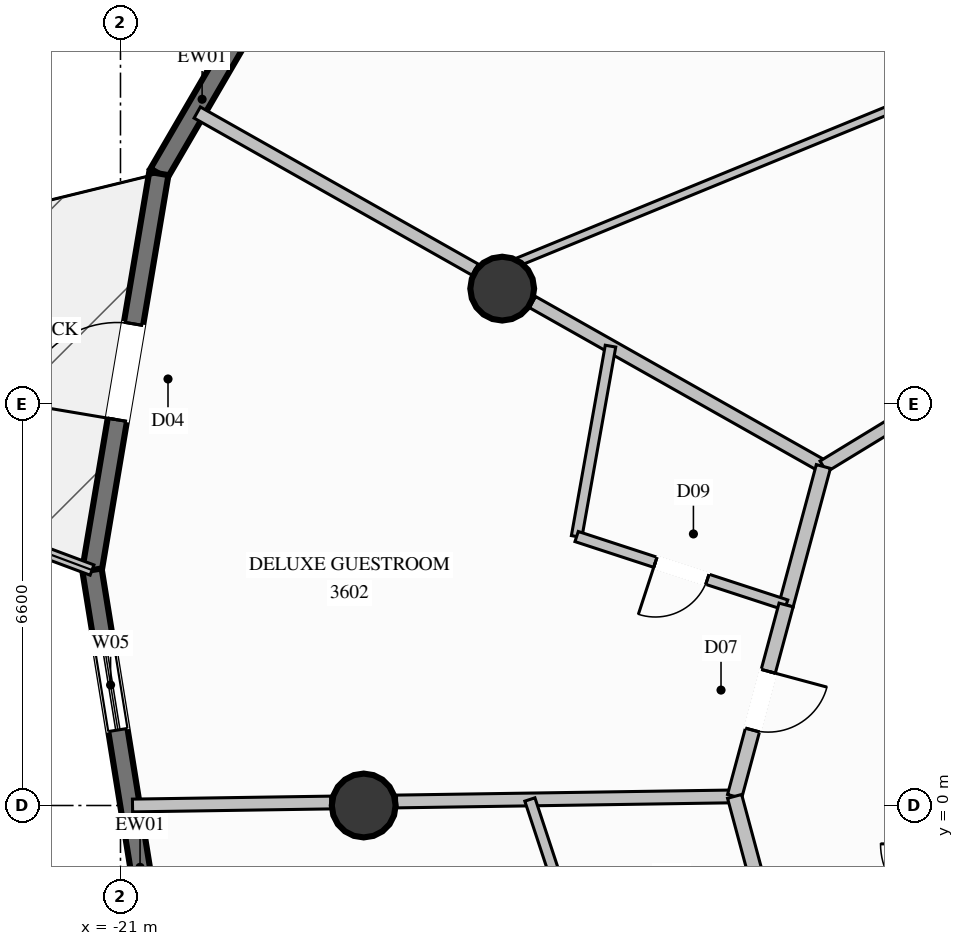
"""IFC4 building model, lengths in metres.
Left out: names, types, materials, properties, quantities, classifications, styles, units other than length and angle.
Written with IfcOpenShell. Run it as: python <this file> out.ifc"""

import sys

from ifc_helpers import new_model, si_unit, direction, frame, frame_2d, origin, origin_2d, place, context, subcontext, project, spatial, rectangle, circle, extrude, element, fill, save


model = new_model("IFC4")
c1 = context("Model", 3, precision=1e-05, world=origin(), true_north=direction((0.0, 1.0)))
c2 = subcontext(c1, "Body", "Model", "MODEL_VIEW")
j1 = project(units=[si_unit("LENGTHUNIT", "METRE"), si_unit("PLANEANGLEUNIT", "RADIAN")], contexts=[c1])
p1 = place(None, origin())
s1 = spatial("IfcSite", under=j1, at=p1, CompositionType="ELEMENT")
p2 = place(p1, origin())
s2 = spatial("IfcBuilding", under=s1, at=p2, CompositionType="ELEMENT")
p3 = place(p2, frame((0.0, 0.0, 135.0)))
s3 = spatial("IfcBuildingStorey", under=s2, at=p3, CompositionType="ELEMENT", Elevation=135.0)
for number, where, z_axis, x_axis in (
    (1, (-14.722, 8.5, 0.0), (0.0, 0.0, 1.0), (1.0, 0.0, 0.0)),
    (2, (-17.0, 0.0, 0.0), (0.0, 0.0, 1.0), (1.0, 0.0, 0.0)),
):
    element("IfcColumn", number, at=place(p3, frame(where, z_axis=z_axis, x_axis=x_axis)), inside=s3, PredefinedType="COLUMN", context=c2, shape_type="SweptSolid", body=[
        extrude(circle(Radius=0.525, at=origin_2d()), origin(), (0.0, 0.0, 1.0), 3.6),
    ])
p4 = place(p3, frame((-20.369, 10.393, 0.0), z_axis=(0.0, 0.0, 1.0), x_axis=(0.503308483644, 0.86410680491, 0.0)))
e3 = element("IfcWall", 3, at=p4, inside=s3, PredefinedType="SOLIDWALL", context=c2, shape_type="SweptSolid", body=[
    extrude(rectangle(XDim=6.369, YDim=0.32, at=frame_2d((3.185, 0.0))), origin(), (0.0, 0.0, 1.0), 3.35),
])
p5 = place(p4, frame((3.077, 0.0, 0.85)))
e4 = element("IfcOpeningElement", 4, at=p5, cuts=e3, PredefinedType="OPENING", context=c2, shape_type="SweptSolid", body=[
    extrude(rectangle(XDim=1.5, YDim=1.2, at=frame_2d((0.75, 0.6))), frame((0.0, 0.17, 0.0), z_axis=(0.0, -1.0, 0.0), x_axis=(1.0, 0.0, 0.0)), (0.0, 0.0, 1.0), 0.34),
])
p6 = place(p3, frame((-21.468, 3.872, 0.0), z_axis=(0.0, 0.0, 1.0), x_axis=(0.166206715806, 0.986090932734, 0.0)))
e5 = element("IfcWall", 5, at=p6, inside=s3, PredefinedType="SOLIDWALL", context=c2, shape_type="SweptSolid", body=[
    extrude(rectangle(XDim=6.613, YDim=0.32, at=frame_2d((3.307, 0.0))), origin(), (0.0, 0.0, 1.0), 3.35),
])
p7 = place(p6, frame((2.506, 0.0, 0.0)))
e6 = element("IfcOpeningElement", 6, at=p7, cuts=e5, PredefinedType="OPENING", context=c2, shape_type="SweptSolid", body=[
    extrude(rectangle(XDim=1.6, YDim=2.3, at=frame_2d((0.8, 1.15))), frame((0.0, 0.17, 0.0), z_axis=(0.0, -1.0, 0.0), x_axis=(1.0, 0.0, 0.0)), (0.0, 0.0, 1.0), 0.34),
])
p8 = place(p3, frame((-20.353, -3.028, 0.0), z_axis=(0.0, 0.0, 1.0), x_axis=(-0.159520152435, 0.987194672274, 0.0)))
e7 = element("IfcWall", 7, at=p8, inside=s3, PredefinedType="SOLIDWALL", context=c2, shape_type="SweptSolid", body=[
    extrude(rectangle(XDim=6.99, YDim=0.32, at=frame_2d((3.495, 0.0))), origin(), (0.0, 0.0, 1.0), 3.35),
])
p9 = place(p8, frame((4.325, 0.0, 0.85)))
e8 = element("IfcOpeningElement", 8, at=p9, cuts=e7, PredefinedType="OPENING", context=c2, shape_type="SweptSolid", body=[
    extrude(rectangle(XDim=1.5, YDim=1.2, at=frame_2d((0.75, 0.6))), frame((0.0, 0.17, 0.0), z_axis=(0.0, -1.0, 0.0), x_axis=(1.0, 0.0, 0.0)), (0.0, 0.0, 1.0), 0.34),
])
p10 = place(p3, frame((-23.568, 4.655, 0.0), z_axis=(0.0, 0.0, 1.0), x_axis=(0.93699893961, -0.349332201736, 0.0)))
e9 = element("IfcWall", 9, at=p10, inside=s3, PredefinedType="PARAPET", context=c2, shape_type="SweptSolid", body=[
    extrude(rectangle(XDim=2.241, YDim=0.18, at=frame_2d((1.121, 0.0))), origin(), (0.0, 0.0, 1.0), 1.12),
])
p11 = place(p3, frame((-9.44, 5.575, 0.0), z_axis=(0.0, 0.0, 1.0), x_axis=(-0.87056283872, 0.492057256668, 0.0)))
e10 = element("IfcWall", 10, at=p11, inside=s3, PredefinedType="PARTITIONING", context=c2, shape_type="SweptSolid", body=[
    extrude(rectangle(XDim=5.496, YDim=0.21, at=frame_2d((2.748, 0.0))), origin(), (0.0, 0.0, 1.0), 2.717),
])
p12 = place(p3, frame((-15.168, 8.813, 0.0), z_axis=(0.0, 0.0, 1.0), x_axis=(-0.870568901918, 0.492046529317, 0.0)))
e11 = element("IfcWall", 11, at=p12, inside=s3, PredefinedType="PARTITIONING", context=c2, shape_type="SweptSolid", body=[
    extrude(rectangle(XDim=5.25, YDim=0.21, at=frame_2d((2.625, 0.0))), origin(), (0.0, 0.0, 1.0), 3.35),
])
p13 = place(p3, frame((-10.9, 0.15, 0.0), z_axis=(0.0, 0.0, 1.0), x_axis=(-0.999885899777, -0.015105873936, 0.0)))
e12 = element("IfcWall", 12, at=p13, inside=s3, PredefinedType="PARTITIONING", context=c2, shape_type="SweptSolid", body=[
    extrude(rectangle(XDim=5.56, YDim=0.21, at=frame_2d((2.78, 0.0))), origin(), (0.0, 0.0, 1.0), 2.419),
])
p14 = place(p3, frame((-17.543, 0.049, 0.0), z_axis=(0.0, 0.0, 1.0), x_axis=(-0.999886658015, -0.015055601038, 0.0)))
e13 = element("IfcWall", 13, at=p14, inside=s3, PredefinedType="PARTITIONING", context=c2, shape_type="SweptSolid", body=[
    extrude(rectangle(XDim=3.26, YDim=0.21, at=frame_2d((1.63, 0.0))), origin(), (0.0, 0.0, 1.0), 2.419),
])
p15 = place(p3, frame((-9.44, 5.575, 0.0), z_axis=(0.0, 0.0, 1.0), x_axis=(0.853641534933, 0.520860950579, 0.0)))
e14 = element("IfcWall", 14, at=p15, inside=s3, PredefinedType="PARTITIONING", context=c2, shape_type="SweptSolid", body=[
    extrude(rectangle(XDim=2.448, YDim=0.21, at=frame_2d((1.224, 0.0))), origin(), (0.0, 0.0, 1.0), 3.35),
])
p16 = place(p3, frame((-15.001, 8.718, 0.0), z_axis=(0.0, 0.0, 1.0), x_axis=(0.925283827326, 0.379275412978, 0.0)))
e15 = element("IfcWall", 15, at=p16, inside=s3, PredefinedType="PARTITIONING", context=c2, shape_type="SweptSolid", body=[
    extrude(rectangle(XDim=16.212, YDim=0.135, at=frame_2d((8.106, 0.0))), origin(), (0.0, 0.0, 1.0), 2.806),
])
p17 = place(p16, frame((7.631, 0.0, 0.0)))
e16 = element("IfcOpeningElement", 16, at=p17, cuts=e15, PredefinedType="OPENING", context=c2, shape_type="SweptSolid", body=[
    extrude(rectangle(XDim=0.95, YDim=2.1, at=frame_2d((0.475, 1.05))), frame((0.0, 0.078, 0.0), z_axis=(0.0, -1.0, 0.0), x_axis=(1.0, 0.0, 0.0)), (0.0, 0.0, 1.0), 0.155),
])
p18 = place(p3, frame((-9.44, 5.575, 0.0), z_axis=(0.0, 0.0, 1.0), x_axis=(-0.25988439237, -0.965639737481, 0.0)))
e17 = element("IfcWall", 17, at=p18, inside=s3, PredefinedType="PARTITIONING", context=c2, shape_type="SweptSolid", body=[
    extrude(rectangle(XDim=2.359, YDim=0.24, at=frame_2d((1.179, 0.0))), origin(), (0.0, 0.0, 1.0), 3.35),
])
p19 = place(p3, frame((-12.941, 7.554, 0.0), z_axis=(0.0, 0.0, 1.0), x_axis=(-0.175195404058, -0.984533681698, 0.0)))
e18 = element("IfcWall", 18, at=p19, inside=s3, PredefinedType="PLUMBINGWALL", context=c2, shape_type="SweptSolid", body=[
    extrude(rectangle(XDim=3.18, YDim=0.175, at=frame_2d((1.59, 0.0))), origin(), (0.0, 0.0, 1.0), 3.35),
])
p20 = place(p3, frame((-10.053, 3.297, 0.0), z_axis=(0.0, 0.0, 1.0), x_axis=(-0.950519426141, 0.310665126027, 0.0)))
e19 = element("IfcWall", 19, at=p20, inside=s3, PredefinedType="PLUMBINGWALL", context=c2, shape_type="SweptSolid", body=[
    extrude(rectangle(XDim=3.625, YDim=0.175, at=frame_2d((1.812, 0.0))), origin(), (0.0, 0.0, 1.0), 3.35),
])
p21 = place(p20, frame((1.362, 0.0, 0.0)))
e20 = element("IfcOpeningElement", 20, at=p21, cuts=e19, PredefinedType="OPENING", context=c2, shape_type="SweptSolid", body=[
    extrude(rectangle(XDim=0.9, YDim=2.1, at=frame_2d((0.45, 1.05))), frame((0.0, 0.098, 0.0), z_axis=(0.0, -1.0, 0.0), x_axis=(1.0, 0.0, 0.0)), (0.0, 0.0, 1.0), 0.195),
])
p22 = place(p3, frame((-10.053, 3.297, 0.0), z_axis=(0.0, 0.0, 1.0), x_axis=(-0.25985795735, -0.965646851598, 0.0)))
e21 = element("IfcWall", 21, at=p22, inside=s3, PredefinedType="PARTITIONING", context=c2, shape_type="SweptSolid", body=[
    extrude(rectangle(XDim=3.259, YDim=0.24, at=frame_2d((1.63, 0.0))), origin(), (0.0, 0.0, 1.0), 3.35),
])
p23 = place(p22, frame((1.129, 0.0, 0.0)))
e22 = element("IfcOpeningElement", 22, at=p23, cuts=e21, PredefinedType="OPENING", context=c2, shape_type="SweptSolid", body=[
    extrude(rectangle(XDim=1.0, YDim=2.2, at=frame_2d((0.5, 1.1))), frame((0.0, 0.13, 0.0), z_axis=(0.0, -1.0, 0.0), x_axis=(1.0, 0.0, 0.0)), (0.0, 0.0, 1.0), 0.26),
])
p24 = place(p3, frame((-10.9, 0.15, 0.0), z_axis=(0.0, 0.0, 1.0), x_axis=(0.259684059781, -0.965693631073, 0.0)))
e23 = element("IfcWall", 23, at=p24, inside=s3, PredefinedType="PARTITIONING", context=c2, shape_type="SweptSolid", body=[
    extrude(rectangle(XDim=2.36, YDim=0.24, at=frame_2d((1.18, 0.0))), origin(), (0.0, 0.0, 1.0), 3.35),
])
p25 = place(p3, frame((-14.267, 0.099, 0.0), z_axis=(0.0, 0.0, 1.0), x_axis=(0.31298893544, -0.949756772175, 0.0)))
e24 = element("IfcWall", 24, at=p25, inside=s3, PredefinedType="PLUMBINGWALL", context=c2, shape_type="SweptSolid", body=[
    extrude(rectangle(XDim=3.055, YDim=0.175, at=frame_2d((1.527, 0.0))), origin(), (0.0, 0.0, 1.0), 3.35),
])
p26 = place(p7, origin())
e25 = element("IfcDoor", 25, at=p26, inside=s3, OperationType="SINGLE_SWING_LEFT", PredefinedType="DOOR", context=c2, shape_type="SweptSolid", body=[
    extrude(rectangle(XDim=1.6, YDim=2.3, at=frame_2d((0.8, 1.15))), frame((0.0, 0.025, 0.0), z_axis=(0.0, -1.0, 0.0), x_axis=(1.0, 0.0, 0.0)), (0.0, 0.0, 1.0), 0.05),
])
fill(e6, e25)
p27 = place(p9, origin())
e26 = element("IfcWindow", 26, at=p27, inside=s3, PartitioningType="SINGLE_PANEL", PredefinedType="WINDOW", context=c2, shape_type="SweptSolid", body=[
    extrude(rectangle(XDim=1.5, YDim=1.2, at=frame_2d((0.75, 0.6))), frame((0.0, 0.03, 0.0), z_axis=(0.0, -1.0, 0.0), x_axis=(1.0, 0.0, 0.0)), (0.0, 0.0, 1.0), 0.06),
])
fill(e8, e26)
p28 = place(p21, origin())
e27 = element("IfcDoor", 27, at=p28, inside=s3, OperationType="SINGLE_SWING_RIGHT", PredefinedType="DOOR", context=c2, shape_type="SweptSolid", body=[
    extrude(rectangle(XDim=0.9, YDim=2.1, at=frame_2d((0.45, 1.05))), frame((0.0, 0.025, 0.0), z_axis=(0.0, -1.0, 0.0), x_axis=(1.0, 0.0, 0.0)), (0.0, 0.0, 1.0), 0.05),
])
fill(e20, e27)
p29 = place(p23, origin())
e28 = element("IfcDoor", 28, at=p29, inside=s3, OperationType="SINGLE_SWING_LEFT", PredefinedType="DOOR", context=c2, shape_type="SweptSolid", body=[
    extrude(rectangle(XDim=1.0, YDim=2.2, at=frame_2d((0.5, 1.1))), frame((0.0, 0.025, 0.0), z_axis=(0.0, -1.0, 0.0), x_axis=(1.0, 0.0, 0.0)), (0.0, 0.0, 1.0), 0.05),
])
fill(e22, e28)
save(model, sys.argv[1])
